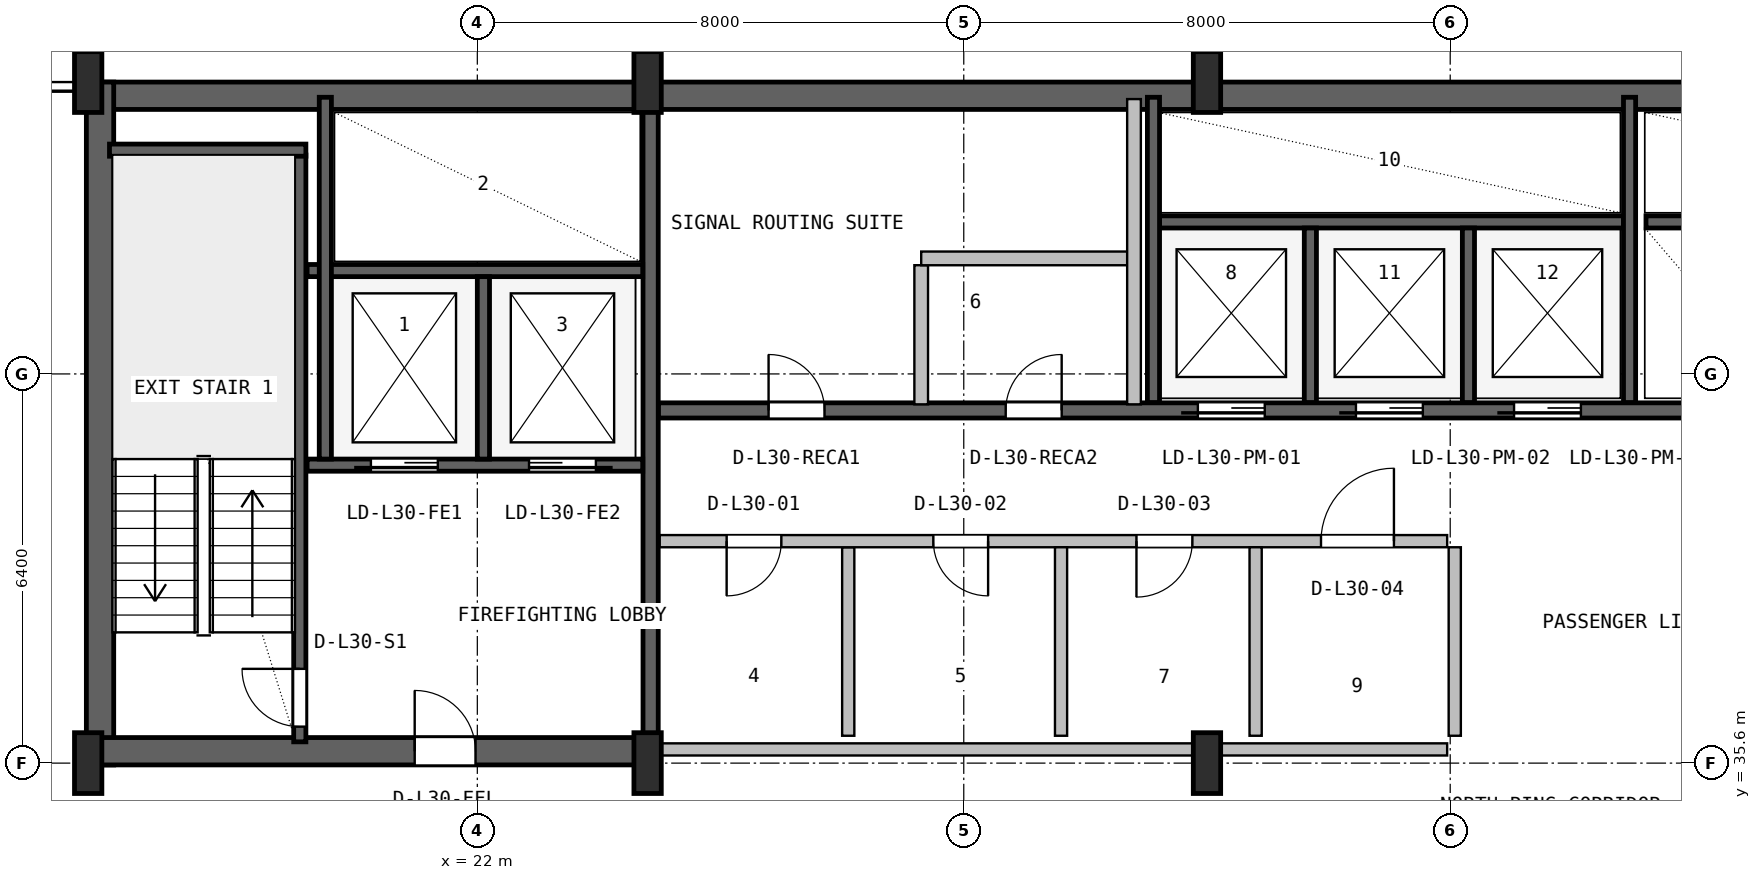
"""IFC4 building model, lengths in metres.
Left out: names, types, materials, properties, quantities, classifications, styles, units other than length and angle.
Written with IfcOpenShell. Run it as: python <this file> out.ifc"""

import sys

from ifc_helpers import new_model, si_unit, direction, frame, frame_2d, origin, origin_2d, place, context, subcontext, project, spatial, rectangle, i_section, extrude, source, transform, mapped, element, fill, save


model = new_model("IFC4")
c1 = context("Model", 3, precision=1e-05, world=origin(), true_north=direction((0.0, 1.0)))
c2 = subcontext(c1, "Body", "Model", "MODEL_VIEW")
j1 = project(units=[si_unit("LENGTHUNIT", "METRE"), si_unit("PLANEANGLEUNIT", "RADIAN")], contexts=[c1])
p1 = place(None, origin())
s1 = spatial("IfcSite", under=j1, at=p1, CompositionType="ELEMENT")
p2 = place(p1, origin())
s2 = spatial("IfcBuilding", under=s1, at=p2, CompositionType="ELEMENT")
p3 = place(p2, frame((0.0, 0.0, 125.8)))
s3 = spatial("IfcBuildingStorey", under=s2, at=p3, CompositionType="ELEMENT", Elevation=125.8)
p4 = place(p3, frame((15.6, 46.575, 0.0), z_axis=(0.0, 0.0, 1.0), x_axis=(1.0, 0.0, 0.0)))
e1 = element("IfcWall", 1, at=p4, inside=s3, PredefinedType="SHEAR", context=c2, shape_type="SweptSolid", body=[
    extrude(rectangle(XDim=36.8, YDim=0.45, at=frame_2d((18.4, 0.0))), origin(), (0.0, 0.0, 1.0), 3.55),
])
p5 = place(p3, frame((15.795, 35.57, 0.0), z_axis=(0.0, 0.0, 1.0), x_axis=(0.0, 1.0, 0.0)))
e2 = element("IfcWall", 2, at=p5, inside=s3, PredefinedType="SHEAR", context=c2, shape_type="SweptSolid", body=[
    extrude(rectangle(XDim=11.23, YDim=0.45, at=frame_2d((5.615, 0.0))), origin(), (0.0, 0.0, 1.0), 3.55),
])
p6 = place(p3, frame((15.57, 35.795, 0.0), z_axis=(0.0, 0.0, 1.0), x_axis=(1.0, 0.0, 0.0)))
e3 = element("IfcWall", 3, at=p6, inside=s3, PredefinedType="SHEAR", context=c2, shape_type="SweptSolid", body=[
    extrude(rectangle(XDim=9.23, YDim=0.45, at=frame_2d((4.615, 0.0))), origin(), (0.0, 0.0, 1.0), 3.55),
])
p7 = place(p6, frame((5.4, 0.0, 0.0)))
e4 = element("IfcOpeningElement", 4, at=p7, cuts=e3, PredefinedType="OPENING", context=c2, shape_type="SweptSolid", body=[
    extrude(rectangle(XDim=1.0, YDim=2.1, at=frame_2d((0.5, 1.05))), frame((0.0, 0.235, 0.0), z_axis=(0.0, -1.0, 0.0), x_axis=(1.0, 0.0, 0.0)), (0.0, 0.0, 1.0), 0.47),
])
m1 = source(origin(), c2, "Body", "SweptSolid", [
    extrude(i_section(OverallWidth=0.45, OverallDepth=1.0, WebThickness=0.016, FlangeThickness=0.03, FilletRadius=0.016, at=origin_2d()), origin(), (0.0, 0.0, 1.0), 3.8),
])
for number, where, z_axis, x_axis in (
    (5, (15.6, 35.6, 0.0), (0.0, 0.0, 1.0), (1.0, 0.0, 0.0)),
    (6, (15.6, 46.8, 0.0), (0.0, 0.0, 1.0), (1.0, 0.0, 0.0)),
    (7, (24.8, 35.6, 0.0), (0.0, 0.0, 1.0), (1.0, 0.0, 0.0)),
    (8, (24.8, 46.8, 0.0), (0.0, 0.0, 1.0), (1.0, 0.0, 0.0)),
    (9, (34.0, 35.6, 0.0), (0.0, 0.0, 1.0), (1.0, 0.0, 0.0)),
    (10, (34.0, 46.8, 0.0), (0.0, 0.0, 1.0), (1.0, 0.0, 0.0)),
):
    element("IfcColumn", number, at=place(p3, frame(where, z_axis=z_axis, x_axis=x_axis)), inside=s3, PredefinedType="COLUMN", context=c2, shape_type="MappedRepresentation", body=[
        mapped(m1, transform((0.0, 0.0, 0.0), x_axis=(1.0, 0.0, 0.0), y_axis=(0.0, 1.0, 0.0), z_axis=(0.0, 0.0, 1.0), scale=1.0)),
    ])
p8 = place(p3, frame((19.08, 35.95, 0.0), z_axis=(0.0, 0.0, 1.0), x_axis=(0.0, 1.0, 0.0)))
e11 = element("IfcWall", 11, at=p8, inside=s3, PredefinedType="SHEAR", context=c2, shape_type="SweptSolid", body=[
    extrude(rectangle(XDim=9.65, YDim=0.2, at=frame_2d((4.825, 0.0))), origin(), (0.0, 0.0, 1.0), 3.55),
])
p9 = place(p8, frame((0.25, 0.0, 0.0)))
e12 = element("IfcOpeningElement", 12, at=p9, cuts=e11, PredefinedType="OPENING", context=c2, shape_type="SweptSolid", body=[
    extrude(rectangle(XDim=0.95, YDim=2.1, at=frame_2d((0.475, 1.05))), frame((0.0, 0.11, 0.0), z_axis=(0.0, -1.0, 0.0), x_axis=(1.0, 0.0, 0.0)), (0.0, 0.0, 1.0), 0.22),
])
p10 = place(p3, frame((15.95, 45.68, 0.0), z_axis=(0.0, 0.0, 1.0), x_axis=(1.0, 0.0, 0.0)))
e13 = element("IfcWall", 13, at=p10, inside=s3, PredefinedType="SHEAR", context=c2, shape_type="SweptSolid", body=[
    extrude(rectangle(XDim=3.23, YDim=0.2, at=frame_2d((1.615, 0.0))), origin(), (0.0, 0.0, 1.0), 3.55),
])
p11 = place(p3, frame((24.85, 36.05, 0.0), z_axis=(0.0, 0.0, 1.0), x_axis=(0.0, 1.0, 0.0)))
e14 = element("IfcWall", 14, at=p11, inside=s3, PredefinedType="SHEAR", context=c2, shape_type="SweptSolid", body=[
    extrude(rectangle(XDim=10.45, YDim=0.25, at=frame_2d((5.225, 0.0))), origin(), (0.0, 0.0, 1.0), 3.55),
])
p12 = place(p3, frame((19.2, 40.5, 0.0), z_axis=(0.0, 0.0, 1.0), x_axis=(1.0, 0.0, 0.0)))
e15 = element("IfcWall", 15, at=p12, inside=s3, PredefinedType="SHEAR", context=c2, shape_type="SweptSolid", body=[
    extrude(rectangle(XDim=5.52, YDim=0.2, at=frame_2d((2.76, 0.0))), origin(), (0.0, 0.0, 1.0), 3.55),
])
p13 = place(p12, frame((1.05, 0.0, 0.0)))
e16 = element("IfcOpeningElement", 16, at=p13, cuts=e15, PredefinedType="OPENING", context=c2, shape_type="SweptSolid", body=[
    extrude(rectangle(XDim=1.1, YDim=2.18, at=frame_2d((0.55, 1.09))), frame((0.0, 0.11, 0.0), z_axis=(0.0, -1.0, 0.0), x_axis=(1.0, 0.0, 0.0)), (0.0, 0.0, 1.0), 0.22),
])
p14 = place(p12, frame((3.65, 0.0, 0.0)))
e17 = element("IfcOpeningElement", 17, at=p14, cuts=e15, PredefinedType="OPENING", context=c2, shape_type="SweptSolid", body=[
    extrude(rectangle(XDim=1.1, YDim=2.18, at=frame_2d((0.55, 1.09))), frame((0.0, 0.11, 0.0), z_axis=(0.0, -1.0, 0.0), x_axis=(1.0, 0.0, 0.0)), (0.0, 0.0, 1.0), 0.22),
])
p15 = place(p3, frame((19.2, 43.7, 0.0), z_axis=(0.0, 0.0, 1.0), x_axis=(1.0, 0.0, 0.0)))
e18 = element("IfcWall", 18, at=p15, inside=s3, PredefinedType="SHEAR", context=c2, shape_type="SweptSolid", body=[
    extrude(rectangle(XDim=5.52, YDim=0.2, at=frame_2d((2.76, 0.0))), origin(), (0.0, 0.0, 1.0), 3.55),
])
p16 = place(p3, frame((22.1, 40.6, 0.0), z_axis=(0.0, 0.0, 1.0), x_axis=(0.0, 1.0, 0.0)))
e19 = element("IfcWall", 19, at=p16, inside=s3, PredefinedType="SHEAR", context=c2, shape_type="SweptSolid", body=[
    extrude(rectangle(XDim=3.0, YDim=0.2, at=frame_2d((1.5, 0.0))), origin(), (0.0, 0.0, 1.0), 3.55),
])
p17 = place(p3, frame((19.5, 40.6, 0.0), z_axis=(0.0, 0.0, 1.0), x_axis=(0.0, 1.0, 0.0)))
e20 = element("IfcWall", 20, at=p17, inside=s3, PredefinedType="SHEAR", context=c2, shape_type="SweptSolid", body=[
    extrude(rectangle(XDim=5.95, YDim=0.2, at=frame_2d((2.975, 0.0))), origin(), (0.0, 0.0, 1.0), 3.55),
])
p18 = place(p3, frame((24.98, 41.4, 0.0), z_axis=(0.0, 0.0, 1.0), x_axis=(1.0, 0.0, 0.0)))
e21 = element("IfcWall", 21, at=p18, inside=s3, PredefinedType="SHEAR", context=c2, shape_type="SweptSolid", body=[
    extrude(rectangle(XDim=23.82, YDim=0.25, at=frame_2d((11.91, 0.0))), origin(), (0.0, 0.0, 1.0), 3.55),
])
p19 = place(p18, frame((8.87, 0.0, 0.0)))
e22 = element("IfcOpeningElement", 22, at=p19, cuts=e21, PredefinedType="OPENING", context=c2, shape_type="SweptSolid", body=[
    extrude(rectangle(XDim=1.1, YDim=2.18, at=frame_2d((0.55, 1.09))), frame((0.0, 0.135, 0.0), z_axis=(0.0, -1.0, 0.0), x_axis=(1.0, 0.0, 0.0)), (0.0, 0.0, 1.0), 0.27),
])
p20 = place(p18, frame((11.47, 0.0, 0.0)))
e23 = element("IfcOpeningElement", 23, at=p20, cuts=e21, PredefinedType="OPENING", context=c2, shape_type="SweptSolid", body=[
    extrude(rectangle(XDim=1.1, YDim=2.18, at=frame_2d((0.55, 1.09))), frame((0.0, 0.135, 0.0), z_axis=(0.0, -1.0, 0.0), x_axis=(1.0, 0.0, 0.0)), (0.0, 0.0, 1.0), 0.27),
])
p21 = place(p18, frame((14.07, 0.0, 0.0)))
e24 = element("IfcOpeningElement", 24, at=p21, cuts=e21, PredefinedType="OPENING", context=c2, shape_type="SweptSolid", body=[
    extrude(rectangle(XDim=1.1, YDim=2.18, at=frame_2d((0.55, 1.09))), frame((0.0, 0.135, 0.0), z_axis=(0.0, -1.0, 0.0), x_axis=(1.0, 0.0, 0.0)), (0.0, 0.0, 1.0), 0.27),
])
p22 = place(p18, frame((1.81, 0.0, 0.0)))
e25 = element("IfcOpeningElement", 25, at=p22, cuts=e21, PredefinedType="OPENING", context=c2, shape_type="SweptSolid", body=[
    extrude(rectangle(XDim=0.92, YDim=2.08, at=frame_2d((0.46, 1.04))), frame((0.0, 0.135, 0.0), z_axis=(0.0, -1.0, 0.0), x_axis=(1.0, 0.0, 0.0)), (0.0, 0.0, 1.0), 0.27),
])
p23 = place(p18, frame((5.71, 0.0, 0.0)))
e26 = element("IfcOpeningElement", 26, at=p23, cuts=e21, PredefinedType="OPENING", context=c2, shape_type="SweptSolid", body=[
    extrude(rectangle(XDim=0.92, YDim=2.08, at=frame_2d((0.46, 1.04))), frame((0.0, 0.135, 0.0), z_axis=(0.0, -1.0, 0.0), x_axis=(1.0, 0.0, 0.0)), (0.0, 0.0, 1.0), 0.27),
])
p24 = place(p3, frame((33.22, 44.5, 0.0), z_axis=(0.0, 0.0, 1.0), x_axis=(1.0, 0.0, 0.0)))
e27 = element("IfcWall", 27, at=p24, inside=s3, PredefinedType="SHEAR", context=c2, shape_type="SweptSolid", body=[
    extrude(rectangle(XDim=7.63, YDim=0.2, at=frame_2d((3.815, 0.0))), origin(), (0.0, 0.0, 1.0), 3.55),
])
p25 = place(p3, frame((33.12, 41.53, 0.0), z_axis=(0.0, 0.0, 1.0), x_axis=(0.0, 1.0, 0.0)))
e28 = element("IfcWall", 28, at=p25, inside=s3, PredefinedType="SHEAR", context=c2, shape_type="SweptSolid", body=[
    extrude(rectangle(XDim=5.02, YDim=0.2, at=frame_2d((2.51, 0.0))), origin(), (0.0, 0.0, 1.0), 3.55),
])
for number, where, z_axis, x_axis in (
    (29, (35.7, 41.53, 0.0), (0.0, 0.0, 1.0), (0.0, 1.0, 0.0)),
    (30, (38.3, 41.53, 0.0), (0.0, 0.0, 1.0), (0.0, 1.0, 0.0)),
):
    element("IfcWall", number, at=place(p3, frame(where, z_axis=z_axis, x_axis=x_axis)), inside=s3, PredefinedType="SHEAR", context=c2, shape_type="SweptSolid", body=[
        extrude(rectangle(XDim=2.87, YDim=0.2, at=frame_2d((1.435, 0.0))), origin(), (0.0, 0.0, 1.0), 3.55),
    ])
p26 = place(p3, frame((40.95, 41.53, 0.0), z_axis=(0.0, 0.0, 1.0), x_axis=(0.0, 1.0, 0.0)))
e31 = element("IfcWall", 31, at=p26, inside=s3, PredefinedType="SHEAR", context=c2, shape_type="SweptSolid", body=[
    extrude(rectangle(XDim=5.02, YDim=0.2, at=frame_2d((2.51, 0.0))), origin(), (0.0, 0.0, 1.0), 3.55),
])
p27 = place(p3, frame((41.22, 44.5, 0.0), z_axis=(0.0, 0.0, 1.0), x_axis=(1.0, 0.0, 0.0)))
e32 = element("IfcWall", 32, at=p27, inside=s3, PredefinedType="SHEAR", context=c2, shape_type="SweptSolid", body=[
    extrude(rectangle(XDim=7.58, YDim=0.2, at=frame_2d((3.79, 0.0))), origin(), (0.0, 0.0, 1.0), 3.55),
])
p28 = place(p3, frame((25.0, 35.825, 0.0), z_axis=(0.0, 0.0, 1.0), x_axis=(1.0, 0.0, 0.0)))
e33 = element("IfcWall", 33, at=p28, inside=s3, PredefinedType="SOLIDWALL", context=c2, shape_type="SweptSolid", body=[
    extrude(rectangle(XDim=12.95, YDim=0.2, at=frame_2d((6.475, 0.0))), origin(), (0.0, 0.0, 1.0), 2.325),
])
p29 = place(p3, frame((28.1, 36.05, 0.0), z_axis=(0.0, 0.0, 1.0), x_axis=(0.0, 1.0, 0.0)))
e34 = element("IfcWall", 34, at=p29, inside=s3, PredefinedType="PLUMBINGWALL", context=c2, shape_type="SweptSolid", body=[
    extrude(rectangle(XDim=3.1, YDim=0.2, at=frame_2d((1.55, 0.0))), origin(), (0.0, 0.0, 1.0), 3.53),
])
p30 = place(p3, frame((25.0, 39.25, 0.0), z_axis=(0.0, 0.0, 1.0), x_axis=(1.0, 0.0, 0.0)))
e35 = element("IfcWall", 35, at=p30, inside=s3, PredefinedType="SOLIDWALL", context=c2, shape_type="SweptSolid", body=[
    extrude(rectangle(XDim=12.95, YDim=0.2, at=frame_2d((6.475, 0.0))), origin(), (0.0, 0.0, 1.0), 3.53),
])
p31 = place(p30, frame((1.1, 0.0, 0.0)))
e36 = element("IfcOpeningElement", 36, at=p31, cuts=e35, PredefinedType="OPENING", context=c2, shape_type="SweptSolid", body=[
    extrude(rectangle(XDim=0.9, YDim=2.06, at=frame_2d((0.45, 1.03))), frame((0.0, 0.11, 0.0), z_axis=(0.0, -1.0, 0.0), x_axis=(1.0, 0.0, 0.0)), (0.0, 0.0, 1.0), 0.22),
])
p32 = place(p30, frame((4.5, 0.0, 0.0)))
e37 = element("IfcOpeningElement", 37, at=p32, cuts=e35, PredefinedType="OPENING", context=c2, shape_type="SweptSolid", body=[
    extrude(rectangle(XDim=0.9, YDim=2.06, at=frame_2d((0.45, 1.03))), frame((0.0, 0.11, 0.0), z_axis=(0.0, -1.0, 0.0), x_axis=(1.0, 0.0, 0.0)), (0.0, 0.0, 1.0), 0.22),
])
p33 = place(p30, frame((7.84, 0.0, 0.0)))
e38 = element("IfcOpeningElement", 38, at=p33, cuts=e35, PredefinedType="OPENING", context=c2, shape_type="SweptSolid", body=[
    extrude(rectangle(XDim=0.92, YDim=2.08, at=frame_2d((0.46, 1.04))), frame((0.0, 0.11, 0.0), z_axis=(0.0, -1.0, 0.0), x_axis=(1.0, 0.0, 0.0)), (0.0, 0.0, 1.0), 0.22),
])
p34 = place(p30, frame((10.875, 0.0, 0.0)))
e39 = element("IfcOpeningElement", 39, at=p34, cuts=e35, PredefinedType="OPENING", context=c2, shape_type="SweptSolid", body=[
    extrude(rectangle(XDim=1.2, YDim=2.1, at=frame_2d((0.6, 1.05))), frame((0.0, 0.11, 0.0), z_axis=(0.0, -1.0, 0.0), x_axis=(1.0, 0.0, 0.0)), (0.0, 0.0, 1.0), 0.22),
])
p35 = place(p3, frame((31.6, 36.05, 0.0), z_axis=(0.0, 0.0, 1.0), x_axis=(0.0, 1.0, 0.0)))
e40 = element("IfcWall", 40, at=p35, inside=s3, PredefinedType="PLUMBINGWALL", context=c2, shape_type="SweptSolid", body=[
    extrude(rectangle(XDim=3.1, YDim=0.2, at=frame_2d((1.55, 0.0))), origin(), (0.0, 0.0, 1.0), 3.53),
])
for number, where, z_axis, x_axis in (
    (41, (34.8, 36.05, 0.0), (0.0, 0.0, 1.0), (0.0, 1.0, 0.0)),
    (42, (38.075, 36.05, 0.0), (0.0, 0.0, 1.0), (0.0, 1.0, 0.0)),
):
    element("IfcWall", number, at=place(p3, frame(where, z_axis=z_axis, x_axis=x_axis)), inside=s3, PredefinedType="SOLIDWALL", context=c2, shape_type="SweptSolid", body=[
        extrude(rectangle(XDim=3.1, YDim=0.2, at=frame_2d((1.55, 0.0))), origin(), (0.0, 0.0, 1.0), 3.53),
    ])
p36 = place(p3, frame((29.3, 41.5, 0.0), z_axis=(0.0, 0.0, 1.0), x_axis=(0.0, 1.0, 0.0)))
e43 = element("IfcWall", 43, at=p36, inside=s3, PredefinedType="PARTITIONING", context=c2, shape_type="SweptSolid", body=[
    extrude(rectangle(XDim=2.288, YDim=0.225, at=frame_2d((1.144, 0.0))), origin(), (0.0, 0.0, 1.0), 3.53),
])
p37 = place(p3, frame((29.3, 43.9, 0.0), z_axis=(0.0, 0.0, 1.0), x_axis=(1.0, 0.0, 0.0)))
e44 = element("IfcWall", 44, at=p37, inside=s3, PredefinedType="PARTITIONING", context=c2, shape_type="SweptSolid", body=[
    extrude(rectangle(XDim=3.5, YDim=0.225, at=frame_2d((1.75, 0.0))), origin(), (0.0, 0.0, 1.0), 3.53),
])
p38 = place(p3, frame((32.8, 41.5, 0.0), z_axis=(0.0, 0.0, 1.0), x_axis=(0.0, 1.0, 0.0)))
e45 = element("IfcWall", 45, at=p38, inside=s3, PredefinedType="PARTITIONING", context=c2, shape_type="SweptSolid", body=[
    extrude(rectangle(XDim=5.02, YDim=0.225, at=frame_2d((2.51, 0.0))), origin(), (0.0, 0.0, 1.0), 3.53),
])
m2 = source(origin(), c2, "Body", "SweptSolid", [
    extrude(rectangle(XDim=0.95, YDim=2.1, at=frame_2d((0.475, 1.05))), frame((0.0, 0.025, 0.0), z_axis=(0.0, -1.0, 0.0), x_axis=(1.0, 0.0, 0.0)), (0.0, 0.0, 1.0), 0.05),
])
p39 = place(p9, origin())
e46 = element("IfcDoor", 46, at=p39, inside=s3, OperationType="SINGLE_SWING_RIGHT", PredefinedType="DOOR", context=c2, shape_type="MappedRepresentation", body=[
    mapped(m2, transform((0.0, 0.0, 0.0), x_axis=(1.0, 0.0, 0.0), y_axis=(0.0, 1.0, 0.0), z_axis=(0.0, 0.0, 1.0), scale=1.0)),
])
fill(e12, e46)
m3 = source(origin(), c2, "Body", "SweptSolid", [
    extrude(rectangle(XDim=1.0, YDim=2.1, at=frame_2d((0.5, 1.05))), frame((0.0, 0.025, 0.0), z_axis=(0.0, -1.0, 0.0), x_axis=(1.0, 0.0, 0.0)), (0.0, 0.0, 1.0), 0.05),
])
p40 = place(p7, origin())
e47 = element("IfcDoor", 47, at=p40, inside=s3, OperationType="SINGLE_SWING_LEFT", PredefinedType="DOOR", context=c2, shape_type="MappedRepresentation", body=[
    mapped(m3, transform((0.0, 0.0, 0.0), x_axis=(1.0, 0.0, 0.0), y_axis=(0.0, 1.0, 0.0), z_axis=(0.0, 0.0, 1.0), scale=1.0)),
])
fill(e4, e47)
m4 = source(origin(), c2, "Body", "SweptSolid", [
    extrude(rectangle(XDim=1.1, YDim=2.18, at=frame_2d((0.55, 1.09))), frame((0.0, 0.025, 0.0), z_axis=(0.0, -1.0, 0.0), x_axis=(1.0, 0.0, 0.0)), (0.0, 0.0, 1.0), 0.05),
])
p41 = place(p13, frame((1.1, 0.0, 0.0), z_axis=(0.0, 0.0, 1.0), x_axis=(-1.0, 0.0, 0.0)))
e48 = element("IfcDoor", 48, at=p41, inside=s3, OperationType="SLIDING_TO_LEFT", PredefinedType="DOOR", context=c2, shape_type="MappedRepresentation", body=[
    mapped(m4, transform((0.0, 0.0, 0.0), x_axis=(1.0, 0.0, 0.0), y_axis=(0.0, 1.0, 0.0), z_axis=(0.0, 0.0, 1.0), scale=1.0)),
])
fill(e16, e48)
p42 = place(p14, frame((1.1, 0.0, 0.0), z_axis=(0.0, 0.0, 1.0), x_axis=(-1.0, 0.0, 0.0)))
e49 = element("IfcDoor", 49, at=p42, inside=s3, OperationType="SLIDING_TO_RIGHT", PredefinedType="DOOR", context=c2, shape_type="MappedRepresentation", body=[
    mapped(m4, transform((0.0, 0.0, 0.0), x_axis=(1.0, 0.0, 0.0), y_axis=(0.0, 1.0, 0.0), z_axis=(0.0, 0.0, 1.0), scale=1.0)),
])
fill(e17, e49)
p43 = place(p19, frame((1.1, 0.0, 0.0), z_axis=(0.0, 0.0, 1.0), x_axis=(-1.0, 0.0, 0.0)))
e50 = element("IfcDoor", 50, at=p43, inside=s3, OperationType="SLIDING_TO_LEFT", PredefinedType="DOOR", context=c2, shape_type="MappedRepresentation", body=[
    mapped(m4, transform((0.0, 0.0, 0.0), x_axis=(1.0, 0.0, 0.0), y_axis=(0.0, 1.0, 0.0), z_axis=(0.0, 0.0, 1.0), scale=1.0)),
])
fill(e22, e50)
p44 = place(p20, frame((1.1, 0.0, 0.0), z_axis=(0.0, 0.0, 1.0), x_axis=(-1.0, 0.0, 0.0)))
e51 = element("IfcDoor", 51, at=p44, inside=s3, OperationType="SLIDING_TO_LEFT", PredefinedType="DOOR", context=c2, shape_type="MappedRepresentation", body=[
    mapped(m4, transform((0.0, 0.0, 0.0), x_axis=(1.0, 0.0, 0.0), y_axis=(0.0, 1.0, 0.0), z_axis=(0.0, 0.0, 1.0), scale=1.0)),
])
fill(e23, e51)
p45 = place(p21, frame((1.1, 0.0, 0.0), z_axis=(0.0, 0.0, 1.0), x_axis=(-1.0, 0.0, 0.0)))
e52 = element("IfcDoor", 52, at=p45, inside=s3, OperationType="SLIDING_TO_LEFT", PredefinedType="DOOR", context=c2, shape_type="MappedRepresentation", body=[
    mapped(m4, transform((0.0, 0.0, 0.0), x_axis=(1.0, 0.0, 0.0), y_axis=(0.0, 1.0, 0.0), z_axis=(0.0, 0.0, 1.0), scale=1.0)),
])
fill(e24, e52)
m5 = source(origin(), c2, "Body", "SweptSolid", [
    extrude(rectangle(XDim=0.92, YDim=2.08, at=frame_2d((0.46, 1.04))), frame((0.0, 0.025, 0.0), z_axis=(0.0, -1.0, 0.0), x_axis=(1.0, 0.0, 0.0)), (0.0, 0.0, 1.0), 0.05),
])
p46 = place(p22, origin())
e53 = element("IfcDoor", 53, at=p46, inside=s3, OperationType="SINGLE_SWING_LEFT", PredefinedType="DOOR", context=c2, shape_type="MappedRepresentation", body=[
    mapped(m5, transform((0.0, 0.0, 0.0), x_axis=(1.0, 0.0, 0.0), y_axis=(0.0, 1.0, 0.0), z_axis=(0.0, 0.0, 1.0), scale=1.0)),
])
fill(e25, e53)
p47 = place(p23, origin())
e54 = element("IfcDoor", 54, at=p47, inside=s3, OperationType="SINGLE_SWING_RIGHT", PredefinedType="DOOR", context=c2, shape_type="MappedRepresentation", body=[
    mapped(m5, transform((0.0, 0.0, 0.0), x_axis=(1.0, 0.0, 0.0), y_axis=(0.0, 1.0, 0.0), z_axis=(0.0, 0.0, 1.0), scale=1.0)),
])
fill(e26, e54)
m6 = source(origin(), c2, "Body", "SweptSolid", [
    extrude(rectangle(XDim=0.9, YDim=2.06, at=frame_2d((0.45, 1.03))), frame((0.0, 0.025, 0.0), z_axis=(0.0, -1.0, 0.0), x_axis=(1.0, 0.0, 0.0)), (0.0, 0.0, 1.0), 0.05),
])
p48 = place(p31, frame((0.9, 0.0, 0.0), z_axis=(0.0, 0.0, 1.0), x_axis=(-1.0, 0.0, 0.0)))
e55 = element("IfcDoor", 55, at=p48, inside=s3, OperationType="SINGLE_SWING_LEFT", PredefinedType="DOOR", context=c2, shape_type="MappedRepresentation", body=[
    mapped(m6, transform((0.0, 0.0, 0.0), x_axis=(1.0, 0.0, 0.0), y_axis=(0.0, 1.0, 0.0), z_axis=(0.0, 0.0, 1.0), scale=1.0)),
])
fill(e36, e55)
p49 = place(p32, frame((0.9, 0.0, 0.0), z_axis=(0.0, 0.0, 1.0), x_axis=(-1.0, 0.0, 0.0)))
e56 = element("IfcDoor", 56, at=p49, inside=s3, OperationType="SINGLE_SWING_RIGHT", PredefinedType="DOOR", context=c2, shape_type="MappedRepresentation", body=[
    mapped(m6, transform((0.0, 0.0, 0.0), x_axis=(1.0, 0.0, 0.0), y_axis=(0.0, 1.0, 0.0), z_axis=(0.0, 0.0, 1.0), scale=1.0)),
])
fill(e37, e56)
p50 = place(p33, frame((0.92, 0.0, 0.0), z_axis=(0.0, 0.0, 1.0), x_axis=(-1.0, 0.0, 0.0)))
e57 = element("IfcDoor", 57, at=p50, inside=s3, OperationType="SINGLE_SWING_LEFT", PredefinedType="DOOR", context=c2, shape_type="MappedRepresentation", body=[
    mapped(m5, transform((0.0, 0.0, 0.0), x_axis=(1.0, 0.0, 0.0), y_axis=(0.0, 1.0, 0.0), z_axis=(0.0, 0.0, 1.0), scale=1.0)),
])
fill(e38, e57)
m7 = source(origin(), c2, "Body", "SweptSolid", [
    extrude(rectangle(XDim=1.2, YDim=2.1, at=frame_2d((0.6, 1.05))), frame((0.0, 0.025, 0.0), z_axis=(0.0, -1.0, 0.0), x_axis=(1.0, 0.0, 0.0)), (0.0, 0.0, 1.0), 0.05),
])
p51 = place(p34, origin())
e58 = element("IfcDoor", 58, at=p51, inside=s3, OperationType="SINGLE_SWING_RIGHT", PredefinedType="DOOR", context=c2, shape_type="MappedRepresentation", body=[
    mapped(m7, transform((0.0, 0.0, 0.0), x_axis=(1.0, 0.0, 0.0), y_axis=(0.0, 1.0, 0.0), z_axis=(0.0, 0.0, 1.0), scale=1.0)),
])
fill(e39, e58)
save(model, sys.argv[1])
